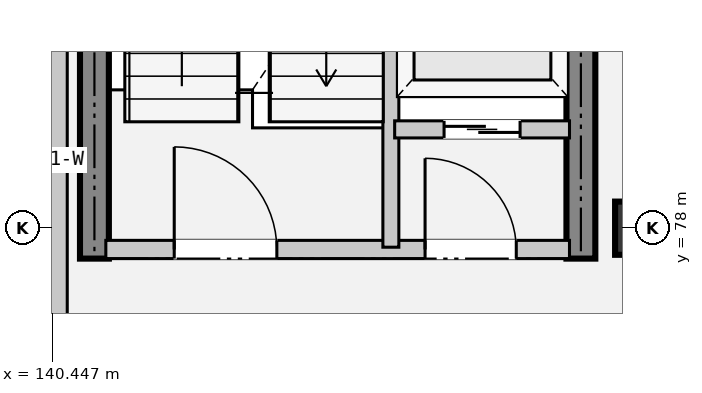
"""IFC4 building model, lengths in metres.
Left out: names, types, materials, properties, quantities, classifications, styles, units other than length and angle.
Written with IfcOpenShell. Run it as: python <this file> out.ifc"""

import sys

from ifc_helpers import new_model, si_unit, direction, frame, frame_2d, origin, origin_2d, place, context, subcontext, project, spatial, rectangle, extrude, element, fill, save


model = new_model("IFC4")
c1 = context("Model", 3, precision=1e-05, world=origin(), true_north=direction((0.0, 1.0)))
c2 = subcontext(c1, "Body", "Model", "MODEL_VIEW")
j1 = project(units=[si_unit("LENGTHUNIT", "METRE"), si_unit("PLANEANGLEUNIT", "RADIAN")], contexts=[c1])
p1 = place(None, origin())
s1 = spatial("IfcSite", under=j1, at=p1, CompositionType="ELEMENT")
p2 = place(p1, origin())
s2 = spatial("IfcBuilding", under=s1, at=p2, CompositionType="ELEMENT")
p3 = place(p2, frame((0.0, 0.0, 5.4)))
s3 = spatial("IfcBuildingStorey", under=s2, at=p3, CompositionType="ELEMENT", Elevation=5.4)
p4 = place(p3, frame((148.2, 78.0, 0.0), z_axis=(0.0, 0.0, 1.0), x_axis=(1.0, 0.0, 0.0)))
e1 = element("IfcColumn", 1, at=p4, inside=s3, PredefinedType="COLUMN", context=c2, shape_type="SweptSolid", body=[
    extrude(rectangle(XDim=0.7, YDim=0.7, at=origin_2d()), origin(), (0.0, 0.0, 1.0), 4.8),
])
for number, where, z_axis, x_axis in (
    (2, (141.0, 77.6, 0.0), (0.0, 0.0, 1.0), (0.0, 1.0, 0.0)),
    (3, (147.4, 77.6, 0.0), (0.0, 0.0, 1.0), (0.0, 1.0, 0.0)),
):
    element("IfcWall", number, at=place(p3, frame(where, z_axis=z_axis, x_axis=x_axis)), inside=s3, PredefinedType="SHEAR", context=c2, shape_type="SweptSolid", body=[
        extrude(rectangle(XDim=8.6, YDim=0.38, at=frame_2d((4.3, 0.0))), origin(), (0.0, 0.0, 1.0), 4.8),
    ])
p5 = place(p3, frame((140.48, 32.0, 0.0), z_axis=(0.0, 0.0, 1.0), x_axis=(0.0, 1.0, 0.0)))
e4 = element("IfcWall", 4, at=p5, inside=s3, PredefinedType="SOLIDWALL", context=c2, shape_type="SweptSolid", body=[
    extrude(rectangle(XDim=78.2, YDim=0.325, at=frame_2d((39.1, 0.0))), origin(), (0.0, 0.0, 1.0), 3.86),
])
p6 = place(p5, frame((5.0, 0.0, 0.78)))
e5 = element("IfcOpeningElement", 5, at=p6, cuts=e4, PredefinedType="OPENING", context=c2, shape_type="SweptSolid", body=[
    extrude(rectangle(XDim=2.1, YDim=2.6, at=frame_2d((1.05, 1.3))), frame((0.0, 0.172, 0.0), z_axis=(0.0, -1.0, 0.0), x_axis=(1.0, 0.0, 0.0)), (0.0, 0.0, 1.0), 0.345),
])
p7 = place(p5, frame((16.7, 0.0, 0.78)))
e6 = element("IfcOpeningElement", 6, at=p7, cuts=e4, PredefinedType="OPENING", context=c2, shape_type="SweptSolid", body=[
    extrude(rectangle(XDim=2.1, YDim=2.6, at=frame_2d((1.05, 1.3))), frame((0.0, 0.172, 0.0), z_axis=(0.0, -1.0, 0.0), x_axis=(1.0, 0.0, 0.0)), (0.0, 0.0, 1.0), 0.345),
])
p8 = place(p5, frame((24.5, 0.0, 0.78)))
e7 = element("IfcOpeningElement", 7, at=p8, cuts=e4, PredefinedType="OPENING", context=c2, shape_type="SweptSolid", body=[
    extrude(rectangle(XDim=2.1, YDim=2.6, at=frame_2d((1.05, 1.3))), frame((0.0, 0.172, 0.0), z_axis=(0.0, -1.0, 0.0), x_axis=(1.0, 0.0, 0.0)), (0.0, 0.0, 1.0), 0.345),
])
p9 = place(p5, frame((32.3, 0.0, 0.78)))
e8 = element("IfcOpeningElement", 8, at=p9, cuts=e4, PredefinedType="OPENING", context=c2, shape_type="SweptSolid", body=[
    extrude(rectangle(XDim=2.1, YDim=2.6, at=frame_2d((1.05, 1.3))), frame((0.0, 0.172, 0.0), z_axis=(0.0, -1.0, 0.0), x_axis=(1.0, 0.0, 0.0)), (0.0, 0.0, 1.0), 0.345),
])
p10 = place(p5, frame((40.1, 0.0, 0.78)))
e9 = element("IfcOpeningElement", 9, at=p10, cuts=e4, PredefinedType="OPENING", context=c2, shape_type="SweptSolid", body=[
    extrude(rectangle(XDim=2.1, YDim=2.6, at=frame_2d((1.05, 1.3))), frame((0.0, 0.172, 0.0), z_axis=(0.0, -1.0, 0.0), x_axis=(1.0, 0.0, 0.0)), (0.0, 0.0, 1.0), 0.345),
])
p11 = place(p5, frame((55.7, 0.0, 0.78)))
e10 = element("IfcOpeningElement", 10, at=p11, cuts=e4, PredefinedType="OPENING", context=c2, shape_type="SweptSolid", body=[
    extrude(rectangle(XDim=2.1, YDim=2.6, at=frame_2d((1.05, 1.3))), frame((0.0, 0.172, 0.0), z_axis=(0.0, -1.0, 0.0), x_axis=(1.0, 0.0, 0.0)), (0.0, 0.0, 1.0), 0.345),
])
p12 = place(p5, frame((59.6, 0.0, 0.78)))
e11 = element("IfcOpeningElement", 11, at=p12, cuts=e4, PredefinedType="OPENING", context=c2, shape_type="SweptSolid", body=[
    extrude(rectangle(XDim=2.1, YDim=2.6, at=frame_2d((1.05, 1.3))), frame((0.0, 0.172, 0.0), z_axis=(0.0, -1.0, 0.0), x_axis=(1.0, 0.0, 0.0)), (0.0, 0.0, 1.0), 0.345),
])
p13 = place(p5, frame((63.5, 0.0, 0.78)))
e12 = element("IfcOpeningElement", 12, at=p13, cuts=e4, PredefinedType="OPENING", context=c2, shape_type="SweptSolid", body=[
    extrude(rectangle(XDim=2.1, YDim=2.6, at=frame_2d((1.05, 1.3))), frame((0.0, 0.172, 0.0), z_axis=(0.0, -1.0, 0.0), x_axis=(1.0, 0.0, 0.0)), (0.0, 0.0, 1.0), 0.345),
])
p14 = place(p5, frame((67.4, 0.0, 0.78)))
e13 = element("IfcOpeningElement", 13, at=p14, cuts=e4, PredefinedType="OPENING", context=c2, shape_type="SweptSolid", body=[
    extrude(rectangle(XDim=2.1, YDim=2.6, at=frame_2d((1.05, 1.3))), frame((0.0, 0.172, 0.0), z_axis=(0.0, -1.0, 0.0), x_axis=(1.0, 0.0, 0.0)), (0.0, 0.0, 1.0), 0.345),
])
p15 = place(p5, frame((71.3, 0.0, 0.78)))
e14 = element("IfcOpeningElement", 14, at=p15, cuts=e4, PredefinedType="OPENING", context=c2, shape_type="SweptSolid", body=[
    extrude(rectangle(XDim=2.1, YDim=2.6, at=frame_2d((1.05, 1.3))), frame((0.0, 0.172, 0.0), z_axis=(0.0, -1.0, 0.0), x_axis=(1.0, 0.0, 0.0)), (0.0, 0.0, 1.0), 0.345),
])
p16 = place(p3, frame((141.15, 77.72, 0.0), z_axis=(0.0, 0.0, 1.0), x_axis=(1.0, 0.0, 0.0)))
e15 = element("IfcWall", 15, at=p16, inside=s3, PredefinedType="PARTITIONING", context=c2, shape_type="SweptSolid", body=[
    extrude(rectangle(XDim=6.1, YDim=0.24, at=frame_2d((3.05, 0.0))), origin(), (0.0, 0.0, 1.0), 3.86),
])
p17 = place(p16, frame((0.9, 0.0, 0.0)))
e16 = element("IfcOpeningElement", 16, at=p17, cuts=e15, PredefinedType="OPENING", context=c2, shape_type="SweptSolid", body=[
    extrude(rectangle(XDim=1.35, YDim=2.2, at=frame_2d((0.675, 1.1))), frame((0.0, 0.13, 0.0), z_axis=(0.0, -1.0, 0.0), x_axis=(1.0, 0.0, 0.0)), (0.0, 0.0, 1.0), 0.26),
])
p18 = place(p16, frame((4.2, 0.0, 0.0)))
e17 = element("IfcOpeningElement", 17, at=p18, cuts=e15, PredefinedType="OPENING", context=c2, shape_type="SweptSolid", body=[
    extrude(rectangle(XDim=1.2, YDim=2.2, at=frame_2d((0.6, 1.1))), frame((0.0, 0.13, 0.0), z_axis=(0.0, -1.0, 0.0), x_axis=(1.0, 0.0, 0.0)), (0.0, 0.0, 1.0), 0.26),
])
p19 = place(p3, frame((144.9, 77.75, 0.0), z_axis=(0.0, 0.0, 1.0), x_axis=(0.0, 1.0, 0.0)))
e18 = element("IfcWall", 18, at=p19, inside=s3, PredefinedType="PARTITIONING", context=c2, shape_type="SweptSolid", body=[
    extrude(rectangle(XDim=8.3, YDim=0.21, at=frame_2d((4.15, 0.0))), origin(), (0.0, 0.0, 1.0), 3.86),
])
p20 = place(p3, frame((144.95, 79.3, 0.0), z_axis=(0.0, 0.0, 1.0), x_axis=(1.0, 0.0, 0.0)))
e19 = element("IfcWall", 19, at=p20, inside=s3, PredefinedType="PARTITIONING", context=c2, shape_type="SweptSolid", body=[
    extrude(rectangle(XDim=2.3, YDim=0.225, at=frame_2d((1.15, 0.0))), origin(), (0.0, 0.0, 1.0), 3.86),
])
p21 = place(p20, frame((0.65, 0.0, 0.0)))
e20 = element("IfcOpeningElement", 20, at=p21, cuts=e19, PredefinedType="OPENING", context=c2, shape_type="SweptSolid", body=[
    extrude(rectangle(XDim=1.0, YDim=2.15, at=frame_2d((0.5, 1.075))), frame((0.0, 0.123, 0.0), z_axis=(0.0, -1.0, 0.0), x_axis=(1.0, 0.0, 0.0)), (0.0, 0.0, 1.0), 0.245),
])
p22 = place(p17, origin())
e21 = element("IfcDoor", 21, at=p22, inside=s3, OperationType="SINGLE_SWING_LEFT", PredefinedType="DOOR", context=c2, shape_type="SweptSolid", body=[
    extrude(rectangle(XDim=1.35, YDim=2.2, at=frame_2d((0.675, 1.1))), frame((0.0, 0.025, 0.0), z_axis=(0.0, -1.0, 0.0), x_axis=(1.0, 0.0, 0.0)), (0.0, 0.0, 1.0), 0.05),
])
fill(e16, e21)
p23 = place(p18, origin())
e22 = element("IfcDoor", 22, at=p23, inside=s3, OperationType="SINGLE_SWING_RIGHT", PredefinedType="DOOR", context=c2, shape_type="SweptSolid", body=[
    extrude(rectangle(XDim=1.2, YDim=2.2, at=frame_2d((0.6, 1.1))), frame((0.0, 0.025, 0.0), z_axis=(0.0, -1.0, 0.0), x_axis=(1.0, 0.0, 0.0)), (0.0, 0.0, 1.0), 0.05),
])
fill(e17, e22)
p24 = place(p21, origin())
e23 = element("IfcDoor", 23, at=p24, inside=s3, OperationType="SLIDING_TO_LEFT", PredefinedType="DOOR", context=c2, shape_type="SweptSolid", body=[
    extrude(rectangle(XDim=1.0, YDim=2.15, at=frame_2d((0.5, 1.075))), frame((0.0, 0.025, 0.0), z_axis=(0.0, -1.0, 0.0), x_axis=(1.0, 0.0, 0.0)), (0.0, 0.0, 1.0), 0.05),
])
fill(e20, e23)
save(model, sys.argv[1])
